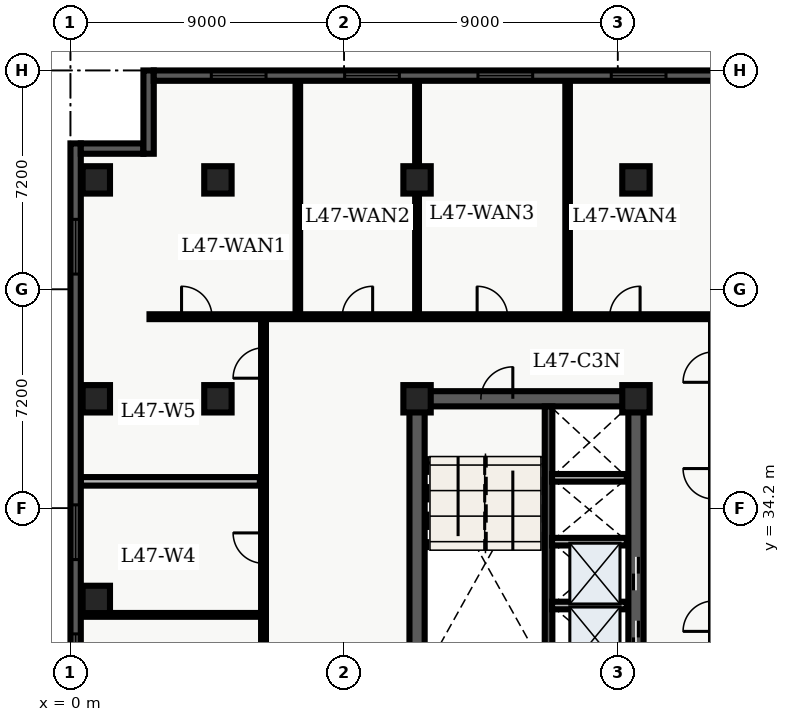
"""IFC4 building model, lengths in metres.
Left out: names, types, materials, properties, quantities, classifications, styles, units other than length and angle.
Written with IfcOpenShell. Run it as: python <this file> out.ifc"""

import sys

from ifc_helpers import new_model, entity, si_unit, converted_unit, direction, frame, origin_with_axes, origin_2d_with_axis, place, context, subcontext, project, spatial, polyline, rectangle, outline, extrude, element, fill, save


model = new_model("IFC4")
c1 = context("Model", 3, precision=1e-05, world=origin_with_axes(), true_north=direction((0.0, 1.0)))
c2 = subcontext(c1, "Body", "Model", "MODEL_VIEW")
j1 = project(units=[si_unit("LENGTHUNIT", "METRE"), converted_unit("PLANEANGLEUNIT", "DEGREE", entity("IfcPlaneAngleMeasure", 0.017), si_unit("PLANEANGLEUNIT", "RADIAN"), dimensions=[0, 0, 0, 0, 0, 0, 0])], contexts=[c1])
p1 = place(None, origin_with_axes())
s1 = spatial("IfcSite", under=j1, at=p1, CompositionType="ELEMENT")
p2 = place(p1, origin_with_axes())
s2 = spatial("IfcBuilding", under=s1, at=p2, CompositionType="ELEMENT")
p3 = place(p2, frame((0.0, 0.0, 192.6), z_axis=(0.0, 0.0, 1.0), x_axis=(1.0, 0.0, 0.0)))
s3 = spatial("IfcBuildingStorey", under=s2, at=p3, CompositionType="ELEMENT", Elevation=192.6)
p4 = place(p3, frame((11.4, 10.8, 0.0), z_axis=(0.0, 0.0, 1.0), x_axis=(0.0, 1.0, 0.0)))
e1 = element("IfcWall", 1, at=p4, inside=s3, PredefinedType="SHEAR", context=c2, shape_type="SweptSolid", body=[
    extrude(outline(polyline([(0.0, -0.25), (27.0, -0.25), (27.0, 0.25), (0.0, 0.25), (0.0, -0.25)])), origin_with_axes(), (0.0, 0.0, 1.0), 3.66),
])
p5 = place(p3, frame((11.4, 37.8, 0.0), z_axis=(0.0, 0.0, 1.0), x_axis=(1.0, 0.0, 0.0)))
e2 = element("IfcWall", 2, at=p5, inside=s3, PredefinedType="SHEAR", context=c2, shape_type="SweptSolid", body=[
    extrude(outline(polyline([(0.0, -0.25), (7.2, -0.25), (7.2, 0.25), (0.0, 0.25), (0.0, -0.25)])), origin_with_axes(), (0.0, 0.0, 1.0), 3.66),
])
p6 = place(p5, frame((2.625, 0.0, 0.0), z_axis=(0.0, 0.0, 1.0), x_axis=(1.0, 0.0, 0.0)))
e3 = element("IfcOpeningElement", 3, at=p6, cuts=e2, PredefinedType="OPENING", context=c2, shape_type="SweptSolid", body=[
    extrude(rectangle(XDim=1.05, YDim=0.52, at=origin_2d_with_axis()), origin_with_axes(), (0.0, 0.0, 1.0), 2.15),
])
p7 = place(p3, frame((18.6, 24.3, 0.0), z_axis=(0.0, 0.0, 1.0), x_axis=(0.0, 1.0, 0.0)))
e4 = element("IfcWall", 4, at=p7, inside=s3, PredefinedType="SHEAR", context=c2, shape_type="SweptSolid", body=[
    extrude(outline(polyline([(0.0, -0.25), (13.5, -0.25), (13.5, 0.25), (0.0, 0.25), (0.0, -0.25)])), origin_with_axes(), (0.0, 0.0, 1.0), 3.66),
])
p8 = place(p7, frame((5.65, 0.0, 0.0), z_axis=(0.0, 0.0, 1.0), x_axis=(1.0, 0.0, 0.0)))
e5 = element("IfcOpeningElement", 5, at=p8, cuts=e4, PredefinedType="OPENING", context=c2, shape_type="SweptSolid", body=[
    extrude(rectangle(XDim=1.1, YDim=0.52, at=origin_2d_with_axis()), origin_with_axes(), (0.0, 0.0, 1.0), 2.15),
])
p9 = place(p7, frame((7.75, 0.0, 0.0), z_axis=(0.0, 0.0, 1.0), x_axis=(1.0, 0.0, 0.0)))
e6 = element("IfcOpeningElement", 6, at=p9, cuts=e4, PredefinedType="OPENING", context=c2, shape_type="SweptSolid", body=[
    extrude(rectangle(XDim=1.1, YDim=0.52, at=origin_2d_with_axis()), origin_with_axes(), (0.0, 0.0, 1.0), 2.15),
])
p10 = place(p3, frame((15.725, 28.9, 0.0), z_axis=(0.0, 0.0, 1.0), x_axis=(0.0, 1.0, 0.0)))
e7 = element("IfcWall", 7, at=p10, inside=s3, PredefinedType="SHEAR", context=c2, shape_type="SweptSolid", body=[
    extrude(outline(polyline([(0.0, -0.125), (8.65, -0.125), (8.65, 0.125), (0.0, 0.125), (0.0, -0.125)])), origin_with_axes(), (0.0, 0.0, 1.0), 3.66),
])
for number, where, z_axis, x_axis in (
    (8, (11.4, 37.8, 0.0), (0.0, 0.0, 1.0), (1.0, 0.0, 0.0)),
    (9, (11.4, 45.0, 0.0), (0.0, 0.0, 1.0), (1.0, 0.0, 0.0)),
    (10, (18.6, 37.8, 0.0), (0.0, 0.0, 1.0), (1.0, 0.0, 0.0)),
    (11, (18.6, 45.0, 0.0), (0.0, 0.0, 1.0), (1.0, 0.0, 0.0)),
    (12, (4.85, 37.8, 0.0), (0.0, 0.0, 1.0), (1.0, 0.0, 0.0)),
    (13, (4.85, 45.0, 0.0), (0.0, 0.0, 1.0), (1.0, 0.0, 0.0)),
    (14, (0.85, 31.2, 0.0), (0.0, 0.0, 1.0), (1.0, 0.0, 0.0)),
    (15, (0.85, 37.8, 0.0), (0.0, 0.0, 1.0), (1.0, 0.0, 0.0)),
    (16, (0.85, 45.0, 0.0), (0.0, 0.0, 1.0), (1.0, 0.0, 0.0)),
):
    element("IfcColumn", number, at=place(p3, frame(where, z_axis=z_axis, x_axis=x_axis)), inside=s3, PredefinedType="COLUMN", context=c2, shape_type="SweptSolid", body=[
        extrude(rectangle(XDim=0.9, YDim=0.9, at=origin_2d_with_axis()), origin_with_axes(), (0.0, 0.0, 1.0), 3.9),
    ])
for number, where, z_axis, x_axis in (
    (17, (15.84, 31.0, 0.0), (0.0, 0.0, 1.0), (1.0, 0.0, 0.0)),
    (18, (15.84, 33.1, 0.0), (0.0, 0.0, 1.0), (1.0, 0.0, 0.0)),
    (19, (15.84, 35.2, 0.0), (0.0, 0.0, 1.0), (1.0, 0.0, 0.0)),
):
    element("IfcWall", number, at=place(p3, frame(where, z_axis=z_axis, x_axis=x_axis)), inside=s3, PredefinedType="SOLIDWALL", context=c2, shape_type="SweptSolid", body=[
        extrude(outline(polyline([(0.0, -0.125), (2.46, -0.125), (2.46, 0.125), (0.0, 0.125), (0.0, -0.125)])), origin_with_axes(), (0.0, 0.0, 1.0), 2.7),
    ])
p11 = place(p3, frame((2.6, 40.5, 0.0), z_axis=(0.0, 0.0, 1.0), x_axis=(1.0, 0.0, 0.0)))
e20 = element("IfcWall", 20, at=p11, inside=s3, PredefinedType="PARTITIONING", context=c2, shape_type="SweptSolid", body=[
    extrude(outline(polyline([(0.0, -0.08), (24.746, -0.08), (24.746, 0.08), (0.0, 0.08), (0.0, -0.08)])), origin_with_axes(), (0.0, 0.0, 1.0), 2.7),
])
p12 = place(p11, frame((1.554, 0.0, 0.0), z_axis=(0.0, 0.0, 1.0), x_axis=(1.0, 0.0, 0.0)))
e21 = element("IfcOpeningElement", 21, at=p12, cuts=e20, PredefinedType="OPENING", context=c2, shape_type="SweptSolid", body=[
    extrude(rectangle(XDim=1.0, YDim=0.18, at=origin_2d_with_axis()), origin_with_axes(), (0.0, 0.0, 1.0), 2.15),
])
p13 = place(p11, frame((6.84, 0.0, 0.0), z_axis=(0.0, 0.0, 1.0), x_axis=(1.0, 0.0, 0.0)))
e22 = element("IfcOpeningElement", 22, at=p13, cuts=e20, PredefinedType="OPENING", context=c2, shape_type="SweptSolid", body=[
    extrude(rectangle(XDim=1.0, YDim=0.18, at=origin_2d_with_axis()), origin_with_axes(), (0.0, 0.0, 1.0), 2.15),
])
p14 = place(p11, frame((11.276, 0.0, 0.0), z_axis=(0.0, 0.0, 1.0), x_axis=(1.0, 0.0, 0.0)))
e23 = element("IfcOpeningElement", 23, at=p14, cuts=e20, PredefinedType="OPENING", context=c2, shape_type="SweptSolid", body=[
    extrude(rectangle(XDim=1.0, YDim=0.18, at=origin_2d_with_axis()), origin_with_axes(), (0.0, 0.0, 1.0), 2.15),
])
p15 = place(p11, frame((15.636, 0.0, 0.0), z_axis=(0.0, 0.0, 1.0), x_axis=(1.0, 0.0, 0.0)))
e24 = element("IfcOpeningElement", 24, at=p15, cuts=e20, PredefinedType="OPENING", context=c2, shape_type="SweptSolid", body=[
    extrude(rectangle(XDim=1.0, YDim=0.18, at=origin_2d_with_axis()), origin_with_axes(), (0.0, 0.0, 1.0), 2.15),
])
p16 = place(p3, frame((6.35, 7.8, 0.0), z_axis=(0.0, 0.0, 1.0), x_axis=(0.0, 1.0, 0.0)))
e25 = element("IfcWall", 25, at=p16, inside=s3, PredefinedType="PARTITIONING", context=c2, shape_type="SweptSolid", body=[
    extrude(outline(polyline([(0.0, -0.08), (32.7, -0.08), (32.7, 0.08), (0.0, 0.08), (0.0, -0.08)])), origin_with_axes(), (0.0, 0.0, 1.0), 2.7),
])
p17 = place(p16, frame((4.415, 0.0, 0.0), z_axis=(0.0, 0.0, 1.0), x_axis=(1.0, 0.0, 0.0)))
e26 = element("IfcOpeningElement", 26, at=p17, cuts=e25, PredefinedType="OPENING", context=c2, shape_type="SweptSolid", body=[
    extrude(rectangle(XDim=1.0, YDim=0.18, at=origin_2d_with_axis()), origin_with_axes(), (0.0, 0.0, 1.0), 2.15),
])
p18 = place(p16, frame((9.986, 0.0, 0.0), z_axis=(0.0, 0.0, 1.0), x_axis=(1.0, 0.0, 0.0)))
e27 = element("IfcOpeningElement", 27, at=p18, cuts=e25, PredefinedType="OPENING", context=c2, shape_type="SweptSolid", body=[
    extrude(rectangle(XDim=1.0, YDim=0.18, at=origin_2d_with_axis()), origin_with_axes(), (0.0, 0.0, 1.0), 2.15),
])
p19 = place(p16, frame((18.332, 0.0, 0.0), z_axis=(0.0, 0.0, 1.0), x_axis=(1.0, 0.0, 0.0)))
e28 = element("IfcOpeningElement", 28, at=p19, cuts=e25, PredefinedType="OPENING", context=c2, shape_type="SweptSolid", body=[
    extrude(rectangle(XDim=1.0, YDim=0.18, at=origin_2d_with_axis()), origin_with_axes(), (0.0, 0.0, 1.0), 2.15),
])
p20 = place(p16, frame((25.088, 0.0, 0.0), z_axis=(0.0, 0.0, 1.0), x_axis=(1.0, 0.0, 0.0)))
e29 = element("IfcOpeningElement", 29, at=p20, cuts=e25, PredefinedType="OPENING", context=c2, shape_type="SweptSolid", body=[
    extrude(rectangle(XDim=1.0, YDim=0.18, at=origin_2d_with_axis()), origin_with_axes(), (0.0, 0.0, 1.0), 2.15),
])
p21 = place(p16, frame((31.177, 0.0, 0.0), z_axis=(0.0, 0.0, 1.0), x_axis=(1.0, 0.0, 0.0)))
e30 = element("IfcOpeningElement", 30, at=p21, cuts=e25, PredefinedType="OPENING", context=c2, shape_type="SweptSolid", body=[
    extrude(rectangle(XDim=1.0, YDim=0.18, at=origin_2d_with_axis()), origin_with_axes(), (0.0, 0.0, 1.0), 2.15),
])
p22 = place(p3, frame((0.335, 30.692, 0.0), z_axis=(0.0, 0.0, 1.0), x_axis=(1.0, 0.0, 0.0)))
e31 = element("IfcWall", 31, at=p22, inside=s3, PredefinedType="PARTITIONING", context=c2, shape_type="SweptSolid", body=[
    extrude(outline(polyline([(0.0, -0.062), (5.895, -0.062), (5.895, 0.062), (0.0, 0.062), (0.0, -0.062)])), origin_with_axes(), (0.0, 0.0, 1.0), 2.7),
])
p23 = place(p3, frame((0.335, 35.084, 0.0), z_axis=(0.0, 0.0, 1.0), x_axis=(1.0, 0.0, 0.0)))
e32 = element("IfcWall", 32, at=p23, inside=s3, PredefinedType="PARTITIONING", context=c2, shape_type="SweptSolid", body=[
    extrude(outline(polyline([(0.0, -0.14), (5.895, -0.14), (5.895, 0.14), (0.0, 0.14), (0.0, -0.14)])), origin_with_axes(), (0.0, 0.0, 1.0), 2.7),
])
p24 = place(p3, frame((7.479, 40.6, 0.0), z_axis=(0.0, 0.0, 1.0), x_axis=(0.0, 1.0, 0.0)))
e33 = element("IfcWall", 33, at=p24, inside=s3, PredefinedType="PARTITIONING", context=c2, shape_type="SweptSolid", body=[
    extrude(outline(polyline([(0.0, -0.075), (7.665, -0.075), (7.665, 0.075), (0.0, 0.075), (0.0, -0.075)])), origin_with_axes(), (0.0, 0.0, 1.0), 2.7),
])
p25 = place(p3, frame((11.4, 40.6, 0.0), z_axis=(0.0, 0.0, 1.0), x_axis=(0.0, 1.0, 0.0)))
e34 = element("IfcWall", 34, at=p25, inside=s3, PredefinedType="PARTITIONING", context=c2, shape_type="SweptSolid", body=[
    extrude(outline(polyline([(0.0, -0.062), (7.665, -0.062), (7.665, 0.062), (0.0, 0.062), (0.0, -0.062)])), origin_with_axes(), (0.0, 0.0, 1.0), 2.7),
])
p26 = place(p3, frame((16.352, 40.6, 0.0), z_axis=(0.0, 0.0, 1.0), x_axis=(0.0, 1.0, 0.0)))
e35 = element("IfcWall", 35, at=p26, inside=s3, PredefinedType="PARTITIONING", context=c2, shape_type="SweptSolid", body=[
    extrude(outline(polyline([(0.0, -0.075), (7.665, -0.075), (7.665, 0.075), (0.0, 0.075), (0.0, -0.075)])), origin_with_axes(), (0.0, 0.0, 1.0), 2.7),
])
p27 = place(p3, frame((0.17, 2.74, 0.0), z_axis=(0.0, 0.0, 1.0), x_axis=(0.0, 1.0, 0.0)))
e36 = element("IfcWall", 36, at=p27, inside=s3, PredefinedType="SOLIDWALL", context=c2, shape_type="SweptSolid", body=[
    extrude(outline(polyline([(0.0, -0.17), (43.46, -0.17), (43.46, 0.17), (0.0, 0.17), (0.0, -0.17)])), origin_with_axes(), (0.0, 0.0, 1.0), 3.66),
])
p28 = place(p27, frame((2.948, 0.0, 0.45), z_axis=(0.0, 0.0, 1.0), x_axis=(1.0, 0.0, 0.0)))
e37 = element("IfcOpeningElement", 37, at=p28, cuts=e36, PredefinedType="OPENING", context=c2, shape_type="SweptSolid", body=[
    extrude(rectangle(XDim=1.8, YDim=0.36, at=origin_2d_with_axis()), origin_with_axes(), (0.0, 0.0, 1.0), 2.1),
])
p29 = place(p27, frame((12.789, 0.0, 0.45), z_axis=(0.0, 0.0, 1.0), x_axis=(1.0, 0.0, 0.0)))
e38 = element("IfcOpeningElement", 38, at=p29, cuts=e36, PredefinedType="OPENING", context=c2, shape_type="SweptSolid", body=[
    extrude(rectangle(XDim=1.8, YDim=0.36, at=origin_2d_with_axis()), origin_with_axes(), (0.0, 0.0, 1.0), 2.1),
])
p30 = place(p27, frame((21.73, 0.0, 0.45), z_axis=(0.0, 0.0, 1.0), x_axis=(1.0, 0.0, 0.0)))
e39 = element("IfcOpeningElement", 39, at=p30, cuts=e36, PredefinedType="OPENING", context=c2, shape_type="SweptSolid", body=[
    extrude(rectangle(XDim=1.8, YDim=0.36, at=origin_2d_with_axis()), origin_with_axes(), (0.0, 0.0, 1.0), 2.1),
])
p31 = place(p27, frame((26.426, 0.0, 0.45), z_axis=(0.0, 0.0, 1.0), x_axis=(1.0, 0.0, 0.0)))
e40 = element("IfcOpeningElement", 40, at=p31, cuts=e36, PredefinedType="OPENING", context=c2, shape_type="SweptSolid", body=[
    extrude(rectangle(XDim=1.8, YDim=0.36, at=origin_2d_with_axis()), origin_with_axes(), (0.0, 0.0, 1.0), 2.1),
])
p32 = place(p27, frame((30.671, 0.0, 0.45), z_axis=(0.0, 0.0, 1.0), x_axis=(1.0, 0.0, 0.0)))
e41 = element("IfcOpeningElement", 41, at=p32, cuts=e36, PredefinedType="OPENING", context=c2, shape_type="SweptSolid", body=[
    extrude(rectangle(XDim=1.8, YDim=0.36, at=origin_2d_with_axis()), origin_with_axes(), (0.0, 0.0, 1.0), 2.1),
])
p33 = place(p27, frame((40.062, 0.0, 0.45), z_axis=(0.0, 0.0, 1.0), x_axis=(1.0, 0.0, 0.0)))
e42 = element("IfcOpeningElement", 42, at=p33, cuts=e36, PredefinedType="OPENING", context=c2, shape_type="SweptSolid", body=[
    extrude(rectangle(XDim=1.8, YDim=0.36, at=origin_2d_with_axis()), origin_with_axes(), (0.0, 0.0, 1.0), 2.1),
])
p34 = place(p3, frame((0.34, 46.03, 0.0), z_axis=(0.0, 0.0, 1.0), x_axis=(1.0, 0.0, 0.0)))
e43 = element("IfcWall", 43, at=p34, inside=s3, PredefinedType="SOLIDWALL", context=c2, shape_type="SweptSolid", body=[
    extrude(outline(polyline([(0.0, -0.17), (2.06, -0.17), (2.06, 0.17), (0.0, 0.17), (0.0, -0.17)])), origin_with_axes(), (0.0, 0.0, 1.0), 3.66),
])
p35 = place(p3, frame((2.57, 45.86, 0.0), z_axis=(0.0, 0.0, 1.0), x_axis=(0.0, 1.0, 0.0)))
e44 = element("IfcWall", 44, at=p35, inside=s3, PredefinedType="SOLIDWALL", context=c2, shape_type="SweptSolid", body=[
    extrude(outline(polyline([(0.0, -0.17), (2.74, -0.17), (2.74, 0.17), (0.0, 0.17), (0.0, -0.17)])), origin_with_axes(), (0.0, 0.0, 1.0), 3.66),
])
p36 = place(p3, frame((2.74, 48.43, 0.0), z_axis=(0.0, 0.0, 1.0), x_axis=(1.0, 0.0, 0.0)))
e45 = element("IfcWall", 45, at=p36, inside=s3, PredefinedType="SOLIDWALL", context=c2, shape_type="SweptSolid", body=[
    extrude(outline(polyline([(0.0, -0.17), (18.741, -0.17), (18.741, 0.17), (0.0, 0.17), (0.0, -0.17)])), origin_with_axes(), (0.0, 0.0, 1.0), 3.66),
])
p37 = place(p36, frame((2.793, 0.0, 0.45), z_axis=(0.0, 0.0, 1.0), x_axis=(1.0, 0.0, 0.0)))
e46 = element("IfcOpeningElement", 46, at=p37, cuts=e45, PredefinedType="OPENING", context=c2, shape_type="SweptSolid", body=[
    extrude(rectangle(XDim=1.8, YDim=0.36, at=origin_2d_with_axis()), origin_with_axes(), (0.0, 0.0, 1.0), 2.1),
])
p38 = place(p36, frame((7.178, 0.0, 0.45), z_axis=(0.0, 0.0, 1.0), x_axis=(1.0, 0.0, 0.0)))
e47 = element("IfcOpeningElement", 47, at=p38, cuts=e45, PredefinedType="OPENING", context=c2, shape_type="SweptSolid", body=[
    extrude(rectangle(XDim=1.8, YDim=0.36, at=origin_2d_with_axis()), origin_with_axes(), (0.0, 0.0, 1.0), 2.1),
])
p39 = place(p36, frame((11.563, 0.0, 0.45), z_axis=(0.0, 0.0, 1.0), x_axis=(1.0, 0.0, 0.0)))
e48 = element("IfcOpeningElement", 48, at=p39, cuts=e45, PredefinedType="OPENING", context=c2, shape_type="SweptSolid", body=[
    extrude(rectangle(XDim=1.8, YDim=0.36, at=origin_2d_with_axis()), origin_with_axes(), (0.0, 0.0, 1.0), 2.1),
])
p40 = place(p36, frame((15.948, 0.0, 0.45), z_axis=(0.0, 0.0, 1.0), x_axis=(1.0, 0.0, 0.0)))
e49 = element("IfcOpeningElement", 49, at=p40, cuts=e45, PredefinedType="OPENING", context=c2, shape_type="SweptSolid", body=[
    extrude(rectangle(XDim=1.8, YDim=0.36, at=origin_2d_with_axis()), origin_with_axes(), (0.0, 0.0, 1.0), 2.1),
])
p41 = place(p7, frame((5.65, 0.0, 0.0), z_axis=(0.0, 0.0, 1.0), x_axis=(1.0, 0.0, 0.0)))
e50 = element("IfcDoor", 50, at=p41, inside=s3, OperationType="SLIDING_TO_LEFT", PredefinedType="DOOR", context=c2, shape_type="SweptSolid", body=[
    extrude(rectangle(XDim=1.1, YDim=0.09, at=origin_2d_with_axis()), origin_with_axes(), (0.0, 0.0, 1.0), 2.15),
])
fill(e5, e50)
p42 = place(p7, frame((7.75, 0.0, 0.0), z_axis=(0.0, 0.0, 1.0), x_axis=(1.0, 0.0, 0.0)))
e51 = element("IfcDoor", 51, at=p42, inside=s3, OperationType="SLIDING_TO_RIGHT", PredefinedType="DOOR", context=c2, shape_type="SweptSolid", body=[
    extrude(rectangle(XDim=1.1, YDim=0.09, at=origin_2d_with_axis()), origin_with_axes(), (0.0, 0.0, 1.0), 2.15),
])
fill(e6, e51)
p43 = place(p5, frame((2.625, 0.0, 0.0), z_axis=(0.0, 0.0, 1.0), x_axis=(1.0, 0.0, 0.0)))
e52 = element("IfcDoor", 52, at=p43, inside=s3, OperationType="SINGLE_SWING_RIGHT", PredefinedType="DOOR", context=c2, shape_type="SweptSolid", body=[
    extrude(rectangle(XDim=1.05, YDim=0.09, at=origin_2d_with_axis()), origin_with_axes(), (0.0, 0.0, 1.0), 2.15),
])
fill(e3, e52)
p44 = place(p16, frame((25.088, 0.0, 0.0), z_axis=(0.0, 0.0, 1.0), x_axis=(1.0, 0.0, 0.0)))
e53 = element("IfcDoor", 53, at=p44, inside=s3, OperationType="SINGLE_SWING_RIGHT", PredefinedType="DOOR", context=c2, shape_type="SweptSolid", body=[
    extrude(rectangle(XDim=1.0, YDim=0.09, at=origin_2d_with_axis()), origin_with_axes(), (0.0, 0.0, 1.0), 2.15),
])
fill(e29, e53)
p45 = place(p16, frame((31.177, 0.0, 0.0), z_axis=(0.0, 0.0, 1.0), x_axis=(1.0, 0.0, 0.0)))
e54 = element("IfcDoor", 54, at=p45, inside=s3, OperationType="SINGLE_SWING_LEFT", PredefinedType="DOOR", context=c2, shape_type="SweptSolid", body=[
    extrude(rectangle(XDim=1.0, YDim=0.09, at=origin_2d_with_axis()), origin_with_axes(), (0.0, 0.0, 1.0), 2.15),
])
fill(e30, e54)
p46 = place(p11, frame((1.554, 0.0, 0.0), z_axis=(0.0, 0.0, 1.0), x_axis=(1.0, 0.0, 0.0)))
e55 = element("IfcDoor", 55, at=p46, inside=s3, OperationType="SINGLE_SWING_LEFT", PredefinedType="DOOR", context=c2, shape_type="SweptSolid", body=[
    extrude(rectangle(XDim=1.0, YDim=0.09, at=origin_2d_with_axis()), origin_with_axes(), (0.0, 0.0, 1.0), 2.15),
])
fill(e21, e55)
p47 = place(p11, frame((6.84, 0.0, 0.0), z_axis=(0.0, 0.0, 1.0), x_axis=(1.0, 0.0, 0.0)))
e56 = element("IfcDoor", 56, at=p47, inside=s3, OperationType="SINGLE_SWING_RIGHT", PredefinedType="DOOR", context=c2, shape_type="SweptSolid", body=[
    extrude(rectangle(XDim=1.0, YDim=0.09, at=origin_2d_with_axis()), origin_with_axes(), (0.0, 0.0, 1.0), 2.15),
])
fill(e22, e56)
p48 = place(p11, frame((11.276, 0.0, 0.0), z_axis=(0.0, 0.0, 1.0), x_axis=(1.0, 0.0, 0.0)))
e57 = element("IfcDoor", 57, at=p48, inside=s3, OperationType="SINGLE_SWING_LEFT", PredefinedType="DOOR", context=c2, shape_type="SweptSolid", body=[
    extrude(rectangle(XDim=1.0, YDim=0.09, at=origin_2d_with_axis()), origin_with_axes(), (0.0, 0.0, 1.0), 2.15),
])
fill(e23, e57)
p49 = place(p11, frame((15.636, 0.0, 0.0), z_axis=(0.0, 0.0, 1.0), x_axis=(1.0, 0.0, 0.0)))
e58 = element("IfcDoor", 58, at=p49, inside=s3, OperationType="SINGLE_SWING_RIGHT", PredefinedType="DOOR", context=c2, shape_type="SweptSolid", body=[
    extrude(rectangle(XDim=1.0, YDim=0.09, at=origin_2d_with_axis()), origin_with_axes(), (0.0, 0.0, 1.0), 2.15),
])
fill(e24, e58)
p50 = place(p27, frame((26.426, 0.0, 0.45), z_axis=(0.0, 0.0, 1.0), x_axis=(1.0, 0.0, 0.0)))
e59 = element("IfcWindow", 59, at=p50, inside=s3, PredefinedType="WINDOW", context=c2, shape_type="SweptSolid", body=[
    extrude(rectangle(XDim=1.8, YDim=0.09, at=origin_2d_with_axis()), origin_with_axes(), (0.0, 0.0, 1.0), 2.1),
])
fill(e40, e59)
p51 = place(p27, frame((30.671, 0.0, 0.45), z_axis=(0.0, 0.0, 1.0), x_axis=(1.0, 0.0, 0.0)))
e60 = element("IfcWindow", 60, at=p51, inside=s3, PredefinedType="WINDOW", context=c2, shape_type="SweptSolid", body=[
    extrude(rectangle(XDim=1.8, YDim=0.09, at=origin_2d_with_axis()), origin_with_axes(), (0.0, 0.0, 1.0), 2.1),
])
fill(e41, e60)
p52 = place(p27, frame((40.062, 0.0, 0.45), z_axis=(0.0, 0.0, 1.0), x_axis=(1.0, 0.0, 0.0)))
e61 = element("IfcWindow", 61, at=p52, inside=s3, PredefinedType="WINDOW", context=c2, shape_type="SweptSolid", body=[
    extrude(rectangle(XDim=1.8, YDim=0.09, at=origin_2d_with_axis()), origin_with_axes(), (0.0, 0.0, 1.0), 2.1),
])
fill(e42, e61)
p53 = place(p36, frame((2.793, 0.0, 0.45), z_axis=(0.0, 0.0, 1.0), x_axis=(1.0, 0.0, 0.0)))
e62 = element("IfcWindow", 62, at=p53, inside=s3, PredefinedType="WINDOW", context=c2, shape_type="SweptSolid", body=[
    extrude(rectangle(XDim=1.8, YDim=0.09, at=origin_2d_with_axis()), origin_with_axes(), (0.0, 0.0, 1.0), 2.1),
])
fill(e46, e62)
p54 = place(p36, frame((7.178, 0.0, 0.45), z_axis=(0.0, 0.0, 1.0), x_axis=(1.0, 0.0, 0.0)))
e63 = element("IfcWindow", 63, at=p54, inside=s3, PredefinedType="WINDOW", context=c2, shape_type="SweptSolid", body=[
    extrude(rectangle(XDim=1.8, YDim=0.09, at=origin_2d_with_axis()), origin_with_axes(), (0.0, 0.0, 1.0), 2.1),
])
fill(e47, e63)
p55 = place(p36, frame((11.563, 0.0, 0.45), z_axis=(0.0, 0.0, 1.0), x_axis=(1.0, 0.0, 0.0)))
e64 = element("IfcWindow", 64, at=p55, inside=s3, PredefinedType="WINDOW", context=c2, shape_type="SweptSolid", body=[
    extrude(rectangle(XDim=1.8, YDim=0.09, at=origin_2d_with_axis()), origin_with_axes(), (0.0, 0.0, 1.0), 2.1),
])
fill(e48, e64)
p56 = place(p36, frame((15.948, 0.0, 0.45), z_axis=(0.0, 0.0, 1.0), x_axis=(1.0, 0.0, 0.0)))
e65 = element("IfcWindow", 65, at=p56, inside=s3, PredefinedType="WINDOW", context=c2, shape_type="SweptSolid", body=[
    extrude(rectangle(XDim=1.8, YDim=0.09, at=origin_2d_with_axis()), origin_with_axes(), (0.0, 0.0, 1.0), 2.1),
])
fill(e49, e65)
save(model, sys.argv[1])
